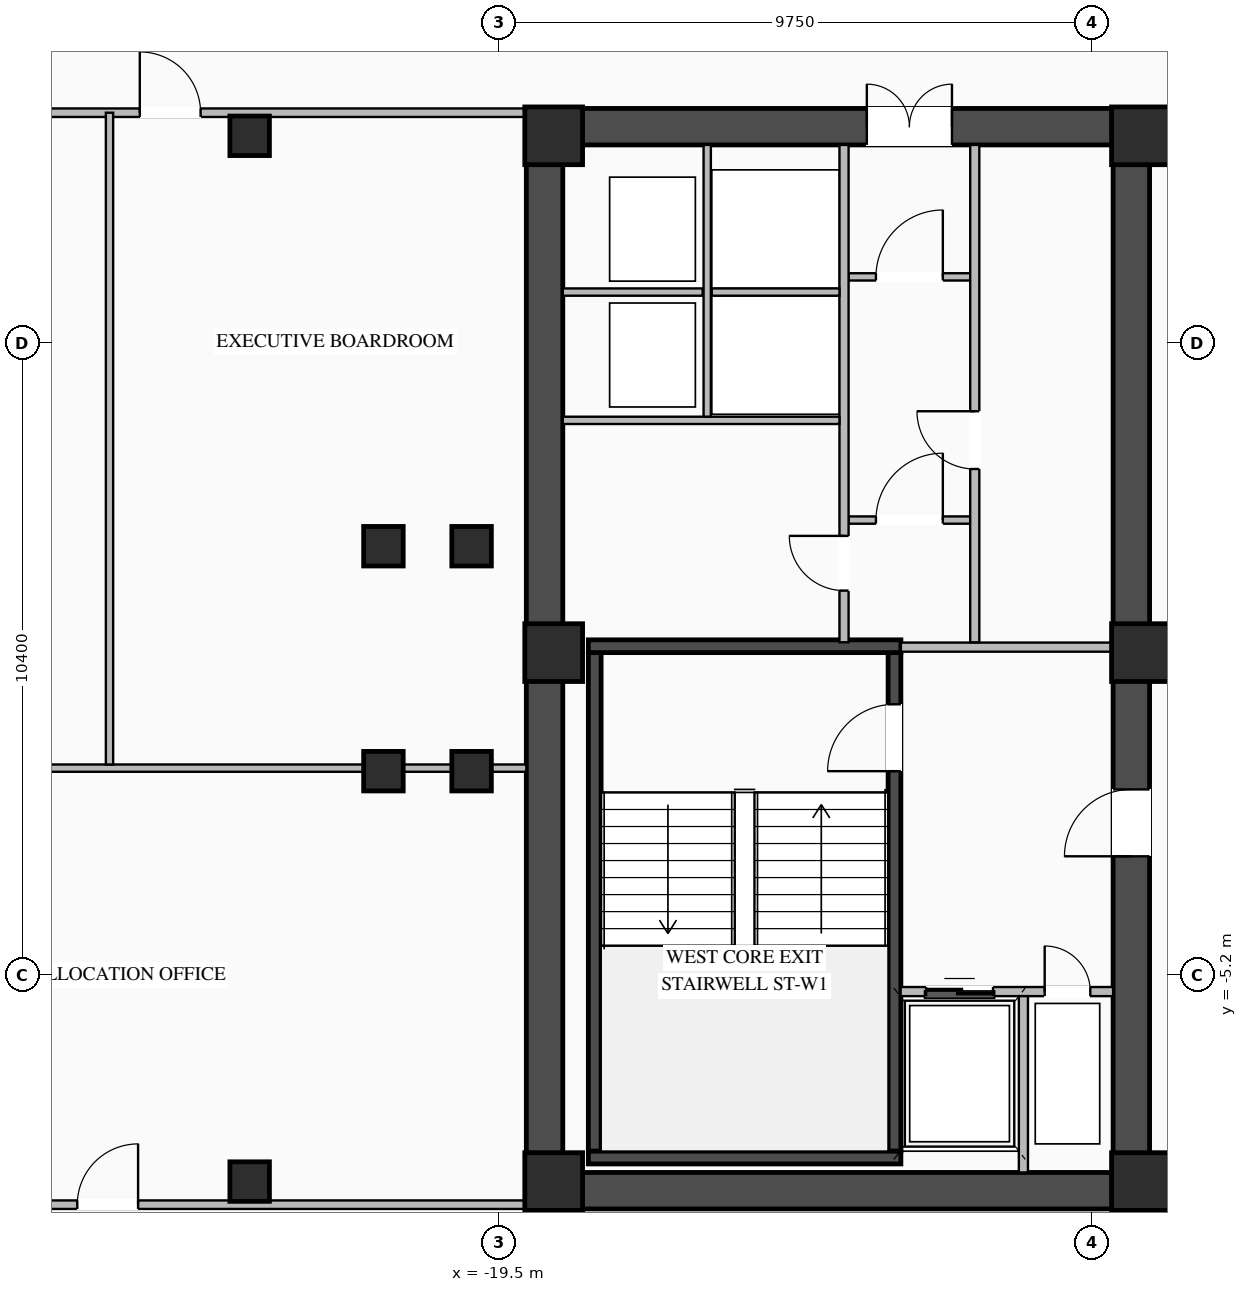
"""IFC4 building model, lengths in metres.
Left out: names, types, materials, properties, quantities, classifications, styles, units other than length and angle.
Written with IfcOpenShell. Run it as: python <this file> out.ifc"""

import sys

from ifc_helpers import new_model, si_unit, direction, frame, frame_2d, origin, origin_2d, place, context, subcontext, project, spatial, rectangle, i_section, extrude, element, fill, save


model = new_model("IFC4")
c1 = context("Model", 3, precision=1e-05, world=origin(), true_north=direction((0.0, 1.0)))
c2 = subcontext(c1, "Body", "Model", "MODEL_VIEW")
j1 = project(units=[si_unit("LENGTHUNIT", "METRE"), si_unit("PLANEANGLEUNIT", "RADIAN")], contexts=[c1])
p1 = place(None, origin())
s1 = spatial("IfcSite", under=j1, at=p1, CompositionType="ELEMENT")
p2 = place(p1, origin())
s2 = spatial("IfcBuilding", under=s1, at=p2, CompositionType="ELEMENT")
p3 = place(p2, frame((0.0, 0.0, 141.55)))
s3 = spatial("IfcBuildingStorey", under=s2, at=p3, CompositionType="ELEMENT", Elevation=141.55)
p4 = place(p3, frame((-19.05, -8.75, 0.0), z_axis=(0.0, 0.0, 1.0), x_axis=(1.0, 0.0, 0.0)))
e1 = element("IfcWall", 1, at=p4, inside=s3, PredefinedType="SHEAR", context=c2, shape_type="SweptSolid", body=[
    extrude(rectangle(XDim=10.25, YDim=0.6, at=frame_2d((5.125, 0.0))), origin(), (0.0, 0.0, 1.0), 3.27),
])
p5 = place(p3, frame((-19.05, 8.75, 0.0), z_axis=(0.0, 0.0, 1.0), x_axis=(1.0, 0.0, 0.0)))
e2 = element("IfcWall", 2, at=p5, inside=s3, PredefinedType="SHEAR", context=c2, shape_type="SweptSolid", body=[
    extrude(rectangle(XDim=10.25, YDim=0.6, at=frame_2d((5.125, 0.0))), origin(), (0.0, 0.0, 1.0), 3.27),
])
p6 = place(p5, frame((5.6, 0.0, 0.0)))
e3 = element("IfcOpeningElement", 3, at=p6, cuts=e2, PredefinedType="OPENING", context=c2, shape_type="SweptSolid", body=[
    extrude(rectangle(XDim=1.4, YDim=2.05, at=frame_2d((0.7, 1.025))), frame((0.0, 0.31, 0.0), z_axis=(0.0, -1.0, 0.0), x_axis=(1.0, 0.0, 0.0)), (0.0, 0.0, 1.0), 0.62),
])
p7 = place(p3, frame((-18.75, -8.45, 0.0), z_axis=(0.0, 0.0, 1.0), x_axis=(0.0, 1.0, 0.0)))
e4 = element("IfcWall", 4, at=p7, inside=s3, PredefinedType="SHEAR", context=c2, shape_type="SweptSolid", body=[
    extrude(rectangle(XDim=16.9, YDim=0.6, at=frame_2d((8.45, 0.0))), origin(), (0.0, 0.0, 1.0), 3.27),
])
p8 = place(p3, frame((-9.1, -8.45, 0.0), z_axis=(0.0, 0.0, 1.0), x_axis=(0.0, 1.0, 0.0)))
e5 = element("IfcWall", 5, at=p8, inside=s3, PredefinedType="SHEAR", context=c2, shape_type="SweptSolid", body=[
    extrude(rectangle(XDim=16.9, YDim=0.6, at=frame_2d((8.45, 0.0))), origin(), (0.0, 0.0, 1.0), 3.27),
])
p9 = place(p8, frame((5.2, 0.0, 0.0)))
e6 = element("IfcOpeningElement", 6, at=p9, cuts=e5, PredefinedType="OPENING", context=c2, shape_type="SweptSolid", body=[
    extrude(rectangle(XDim=1.1, YDim=2.08, at=frame_2d((0.55, 1.04))), frame((0.0, 0.31, 0.0), z_axis=(0.0, -1.0, 0.0), x_axis=(1.0, 0.0, 0.0)), (0.0, 0.0, 1.0), 0.62),
])
p10 = place(p3, frame((-12.995, -8.1, 0.0), z_axis=(0.0, 0.0, 1.0), x_axis=(0.0, 1.0, 0.0)))
e7 = element("IfcWall", 7, at=p10, inside=s3, PredefinedType="SHEAR", context=c2, shape_type="SweptSolid", body=[
    extrude(rectangle(XDim=8.2, YDim=0.21, at=frame_2d((4.1, 0.0))), origin(), (0.0, 0.0, 1.0), 3.27),
])
p11 = place(p10, frame((6.25, 0.0, 0.0)))
e8 = element("IfcOpeningElement", 8, at=p11, cuts=e7, PredefinedType="OPENING", context=c2, shape_type="SweptSolid", body=[
    extrude(rectangle(XDim=1.1, YDim=2.15, at=frame_2d((0.55, 1.075))), frame((0.0, 0.115, 0.0), z_axis=(0.0, -1.0, 0.0), x_axis=(1.0, 0.0, 0.0)), (0.0, 0.0, 1.0), 0.23),
])
p12 = place(p3, frame((-17.925, -8.1, 0.0), z_axis=(0.0, 0.0, 1.0), x_axis=(0.0, 1.0, 0.0)))
e9 = element("IfcWall", 9, at=p12, inside=s3, PredefinedType="SHEAR", context=c2, shape_type="SweptSolid", body=[
    extrude(rectangle(XDim=8.2, YDim=0.21, at=frame_2d((4.1, 0.0))), origin(), (0.0, 0.0, 1.0), 3.27),
])
for number, where, z_axis, x_axis in (
    (10, (-18.03, -8.205, 0.0), (0.0, 0.0, 1.0), (1.0, 0.0, 0.0)),
    (11, (-12.89, 0.205, 0.0), (0.0, 0.0, 1.0), (-1.0, 0.0, 0.0)),
):
    element("IfcWall", number, at=place(p3, frame(where, z_axis=z_axis, x_axis=x_axis)), inside=s3, PredefinedType="SHEAR", context=c2, shape_type="SweptSolid", body=[
        extrude(rectangle(XDim=5.14, YDim=0.21, at=frame_2d((2.57, 0.0))), origin(), (0.0, 0.0, 1.0), 3.27),
    ])
for number, where, z_axis, x_axis in (
    (12, (-8.95, -8.6, 0.0), (0.0, 0.0, 1.0), (1.0, 0.0, 0.0)),
    (13, (-8.95, 0.1, 0.0), (0.0, 0.0, 1.0), (1.0, 0.0, 0.0)),
    (14, (-8.95, 8.6, 0.0), (0.0, 0.0, 1.0), (1.0, 0.0, 0.0)),
    (15, (-18.6, -8.6, 0.0), (0.0, 0.0, 1.0), (1.0, 0.0, 0.0)),
    (16, (-18.6, 0.1, 0.0), (0.0, 0.0, 1.0), (1.0, 0.0, 0.0)),
    (17, (-18.6, 8.6, 0.0), (0.0, 0.0, 1.0), (1.0, 0.0, 0.0)),
):
    element("IfcColumn", number, at=place(p3, frame(where, z_axis=z_axis, x_axis=x_axis)), inside=s3, PredefinedType="COLUMN", context=c2, shape_type="SweptSolid", body=[
        extrude(rectangle(XDim=0.95, YDim=0.95, at=origin_2d()), origin(), (0.0, 0.0, 1.0), 3.45),
    ])
for number, where, z_axis, x_axis in (
    (18, (-21.4, -1.85, 0.0), (0.0, 0.0, 1.0), (1.0, 0.0, 0.0)),
    (19, (-21.4, 1.85, 0.0), (0.0, 0.0, 1.0), (1.0, 0.0, 0.0)),
    (20, (-19.95, -1.85, 0.0), (0.0, 0.0, 1.0), (1.0, 0.0, 0.0)),
    (21, (-19.95, 1.85, 0.0), (0.0, 0.0, 1.0), (1.0, 0.0, 0.0)),
    (22, (-23.6, -8.6, 0.0), (0.0, 0.0, 1.0), (1.0, 0.0, 0.0)),
    (23, (-23.6, 8.6, 0.0), (0.0, 0.0, 1.0), (1.0, 0.0, 0.0)),
):
    element("IfcColumn", number, at=place(p3, frame(where, z_axis=z_axis, x_axis=x_axis)), inside=s3, PredefinedType="COLUMN", context=c2, shape_type="SweptSolid", body=[
        extrude(i_section(OverallWidth=0.65, OverallDepth=0.65, WebThickness=0.028, FlangeThickness=0.04, at=origin_2d()), origin(), (0.0, 0.0, 1.0), 3.45),
    ])
p13 = place(p3, frame((-12.895, -5.475, 0.0), z_axis=(0.0, 0.0, 1.0), x_axis=(1.0, 0.0, 0.0)))
e24 = element("IfcWall", 24, at=p13, inside=s3, PredefinedType="STANDARD", context=c2, shape_type="SweptSolid", body=[
    extrude(rectangle(XDim=3.495, YDim=0.15, at=frame_2d((1.748, 0.0))), origin(), (0.0, 0.0, 1.0), 3.25),
])
p14 = place(p13, frame((0.42, 0.0, 0.0)))
e25 = element("IfcOpeningElement", 25, at=p14, cuts=e24, PredefinedType="OPENING", context=c2, shape_type="SweptSolid", body=[
    extrude(rectangle(XDim=1.1, YDim=2.15, at=frame_2d((0.55, 1.075))), frame((0.0, 0.085, 0.0), z_axis=(0.0, -1.0, 0.0), x_axis=(1.0, 0.0, 0.0)), (0.0, 0.0, 1.0), 0.17),
])
p15 = place(p13, frame((2.37, 0.0, 0.0)))
e26 = element("IfcOpeningElement", 26, at=p15, cuts=e24, PredefinedType="OPENING", context=c2, shape_type="SweptSolid", body=[
    extrude(rectangle(XDim=0.75, YDim=2.05, at=frame_2d((0.375, 1.025))), frame((0.0, 0.085, 0.0), z_axis=(0.0, -1.0, 0.0), x_axis=(1.0, 0.0, 0.0)), (0.0, 0.0, 1.0), 0.17),
])
p16 = place(p3, frame((-10.875, -8.45, 0.0), z_axis=(0.0, 0.0, 1.0), x_axis=(0.0, 1.0, 0.0)))
e27 = element("IfcWall", 27, at=p16, inside=s3, PredefinedType="STANDARD", context=c2, shape_type="SweptSolid", body=[
    extrude(rectangle(XDim=2.9, YDim=0.15, at=frame_2d((1.45, 0.0))), origin(), (0.0, 0.0, 1.0), 3.25),
])
p17 = place(p3, frame((-12.89, 0.19, 0.0), z_axis=(0.0, 0.0, 1.0), x_axis=(1.0, 0.0, 0.0)))
e28 = element("IfcWall", 28, at=p17, inside=s3, PredefinedType="STANDARD", context=c2, shape_type="SweptSolid", body=[
    extrude(rectangle(XDim=3.49, YDim=0.15, at=frame_2d((1.745, 0.0))), origin(), (0.0, 0.0, 1.0), 2.645),
])
p18 = place(p3, frame((-13.75, 2.28, 0.0), z_axis=(0.0, 0.0, 1.0), x_axis=(1.0, 0.0, 0.0)))
e29 = element("IfcWall", 29, at=p18, inside=s3, PredefinedType="STANDARD", context=c2, shape_type="SweptSolid", body=[
    extrude(rectangle(XDim=2.0, YDim=0.12, at=frame_2d((1.0, 0.0))), origin(), (0.0, 0.0, 1.0), 3.25),
])
p19 = place(p18, frame((0.45, 0.0, 0.0)))
e30 = element("IfcOpeningElement", 30, at=p19, cuts=e29, PredefinedType="OPENING", context=c2, shape_type="SweptSolid", body=[
    extrude(rectangle(XDim=1.1, YDim=2.1, at=frame_2d((0.55, 1.05))), frame((0.0, 0.07, 0.0), z_axis=(0.0, -1.0, 0.0), x_axis=(1.0, 0.0, 0.0)), (0.0, 0.0, 1.0), 0.14),
])
p20 = place(p3, frame((-13.75, 6.28, 0.0), z_axis=(0.0, 0.0, 1.0), x_axis=(1.0, 0.0, 0.0)))
e31 = element("IfcWall", 31, at=p20, inside=s3, PredefinedType="STANDARD", context=c2, shape_type="SweptSolid", body=[
    extrude(rectangle(XDim=2.0, YDim=0.12, at=frame_2d((1.0, 0.0))), origin(), (0.0, 0.0, 1.0), 3.25),
])
p21 = place(p20, frame((0.45, 0.0, 0.0)))
e32 = element("IfcOpeningElement", 32, at=p21, cuts=e31, PredefinedType="OPENING", context=c2, shape_type="SweptSolid", body=[
    extrude(rectangle(XDim=1.1, YDim=2.1, at=frame_2d((0.55, 1.05))), frame((0.0, 0.07, 0.0), z_axis=(0.0, -1.0, 0.0), x_axis=(1.0, 0.0, 0.0)), (0.0, 0.0, 1.0), 0.14),
])
p22 = place(p3, frame((-11.675, 0.27, 0.0), z_axis=(0.0, 0.0, 1.0), x_axis=(0.0, 1.0, 0.0)))
e33 = element("IfcWall", 33, at=p22, inside=s3, PredefinedType="STANDARD", context=c2, shape_type="SweptSolid", body=[
    extrude(rectangle(XDim=8.18, YDim=0.15, at=frame_2d((4.09, 0.0))), origin(), (0.0, 0.0, 1.0), 3.25),
])
p23 = place(p22, frame((2.85, 0.0, 0.0)))
e34 = element("IfcOpeningElement", 34, at=p23, cuts=e33, PredefinedType="OPENING", context=c2, shape_type="SweptSolid", body=[
    extrude(rectangle(XDim=0.95, YDim=2.05, at=frame_2d((0.475, 1.025))), frame((0.0, 0.085, 0.0), z_axis=(0.0, -1.0, 0.0), x_axis=(1.0, 0.0, 0.0)), (0.0, 0.0, 1.0), 0.17),
])
p24 = place(p3, frame((-13.825, 0.27, 0.0), z_axis=(0.0, 0.0, 1.0), x_axis=(0.0, 1.0, 0.0)))
e35 = element("IfcWall", 35, at=p24, inside=s3, PredefinedType="STANDARD", context=c2, shape_type="SweptSolid", body=[
    extrude(rectangle(XDim=8.18, YDim=0.15, at=frame_2d((4.09, 0.0))), origin(), (0.0, 0.0, 1.0), 3.25),
])
p25 = place(p24, frame((0.85, 0.0, 0.0)))
e36 = element("IfcOpeningElement", 36, at=p25, cuts=e35, PredefinedType="OPENING", context=c2, shape_type="SweptSolid", body=[
    extrude(rectangle(XDim=0.9, YDim=2.05, at=frame_2d((0.45, 1.025))), frame((0.0, 0.085, 0.0), z_axis=(0.0, -1.0, 0.0), x_axis=(1.0, 0.0, 0.0)), (0.0, 0.0, 1.0), 0.17),
])
p26 = place(p3, frame((-18.45, 3.92, 0.0), z_axis=(0.0, 0.0, 1.0), x_axis=(1.0, 0.0, 0.0)))
e37 = element("IfcWall", 37, at=p26, inside=s3, PredefinedType="STANDARD", context=c2, shape_type="SweptSolid", body=[
    extrude(rectangle(XDim=4.55, YDim=0.12, at=frame_2d((2.275, 0.0))), origin(), (0.0, 0.0, 1.0), 3.25),
])
p27 = place(p3, frame((-18.45, 6.03, 0.0), z_axis=(0.0, 0.0, 1.0), x_axis=(1.0, 0.0, 0.0)))
e38 = element("IfcWall", 38, at=p27, inside=s3, PredefinedType="STANDARD", context=c2, shape_type="SweptSolid", body=[
    extrude(rectangle(XDim=2.3, YDim=0.12, at=frame_2d((1.15, 0.0))), origin(), (0.0, 0.0, 1.0), 3.25),
])
p28 = place(p3, frame((-16.075, 3.98, 0.0), z_axis=(0.0, 0.0, 1.0), x_axis=(0.0, 1.0, 0.0)))
e39 = element("IfcWall", 39, at=p28, inside=s3, PredefinedType="STANDARD", context=c2, shape_type="SweptSolid", body=[
    extrude(rectangle(XDim=4.47, YDim=0.12, at=frame_2d((2.235, 0.0))), origin(), (0.0, 0.0, 1.0), 3.25),
])
p29 = place(p3, frame((-16.0, 6.03, 0.0), z_axis=(0.0, 0.0, 1.0), x_axis=(1.0, 0.0, 0.0)))
e40 = element("IfcWall", 40, at=p29, inside=s3, PredefinedType="STANDARD", context=c2, shape_type="SweptSolid", body=[
    extrude(rectangle(XDim=2.1, YDim=0.12, at=frame_2d((1.05, 0.0))), origin(), (0.0, 0.0, 1.0), 3.25),
])
p30 = place(p3, frame((-32.82, 8.98, 0.0), z_axis=(0.0, 0.0, 1.0), x_axis=(1.0, 0.0, 0.0)))
e41 = element("IfcWall", 41, at=p30, inside=s3, PredefinedType="STANDARD", context=c2, shape_type="SweptSolid", body=[
    extrude(rectangle(XDim=13.77, YDim=0.14, at=frame_2d((6.885, 0.0))), origin(), (0.0, 0.0, 1.0), 3.25),
])
p31 = place(p30, frame((1.171, 0.0, 0.0)))
e42 = element("IfcOpeningElement", 42, at=p31, cuts=e41, PredefinedType="OPENING", context=c2, shape_type="SweptSolid", body=[
    extrude(rectangle(XDim=1.0, YDim=2.08, at=frame_2d((0.5, 1.04))), frame((0.0, 0.08, 0.0), z_axis=(0.0, -1.0, 0.0), x_axis=(1.0, 0.0, 0.0)), (0.0, 0.0, 1.0), 0.16),
])
p32 = place(p30, frame((7.413, 0.0, 0.0)))
e43 = element("IfcOpeningElement", 43, at=p32, cuts=e41, PredefinedType="OPENING", context=c2, shape_type="SweptSolid", body=[
    extrude(rectangle(XDim=1.0, YDim=2.08, at=frame_2d((0.5, 1.04))), frame((0.0, 0.08, 0.0), z_axis=(0.0, -1.0, 0.0), x_axis=(1.0, 0.0, 0.0)), (0.0, 0.0, 1.0), 0.16),
])
p33 = place(p3, frame((-32.82, -8.98, 0.0), z_axis=(0.0, 0.0, 1.0), x_axis=(1.0, 0.0, 0.0)))
e44 = element("IfcWall", 44, at=p33, inside=s3, PredefinedType="STANDARD", context=c2, shape_type="SweptSolid", body=[
    extrude(rectangle(XDim=13.77, YDim=0.14, at=frame_2d((6.885, 0.0))), origin(), (0.0, 0.0, 1.0), 3.25),
])
p34 = place(p33, frame((6.385, 0.0, 0.0)))
e45 = element("IfcOpeningElement", 45, at=p34, cuts=e44, PredefinedType="OPENING", context=c2, shape_type="SweptSolid", body=[
    extrude(rectangle(XDim=1.0, YDim=2.08, at=frame_2d((0.5, 1.04))), frame((0.0, 0.08, 0.0), z_axis=(0.0, -1.0, 0.0), x_axis=(1.0, 0.0, 0.0)), (0.0, 0.0, 1.0), 0.16),
])
p35 = place(p3, frame((-32.82, -1.8, 0.0), z_axis=(0.0, 0.0, 1.0), x_axis=(1.0, 0.0, 0.0)))
e46 = element("IfcWall", 46, at=p35, inside=s3, PredefinedType="STANDARD", context=c2, shape_type="SweptSolid", body=[
    extrude(rectangle(XDim=13.77, YDim=0.12, at=frame_2d((6.885, 0.0))), origin(), (0.0, 0.0, 1.0), 3.25),
])
p36 = place(p3, frame((-25.905, -1.74, 0.0), z_axis=(0.0, 0.0, 1.0), x_axis=(0.0, 1.0, 0.0)))
e47 = element("IfcWall", 47, at=p36, inside=s3, PredefinedType="STANDARD", context=c2, shape_type="SweptSolid", body=[
    extrude(rectangle(XDim=10.72, YDim=0.12, at=frame_2d((5.36, 0.0))), origin(), (0.0, 0.0, 1.0), 3.25),
])
p37 = place(p11, origin())
e48 = element("IfcDoor", 48, at=p37, inside=s3, OperationType="SINGLE_SWING_LEFT", PredefinedType="DOOR", context=c2, shape_type="SweptSolid", body=[
    extrude(rectangle(XDim=1.1, YDim=2.15, at=frame_2d((0.55, 1.075))), frame((0.0, 0.025, 0.0), z_axis=(0.0, -1.0, 0.0), x_axis=(1.0, 0.0, 0.0)), (0.0, 0.0, 1.0), 0.05),
])
fill(e8, e48)
p38 = place(p14, origin())
e49 = element("IfcDoor", 49, at=p38, inside=s3, OperationType="DOUBLE_DOOR_SLIDING", PredefinedType="DOOR", context=c2, shape_type="SweptSolid", body=[
    extrude(rectangle(XDim=1.1, YDim=2.15, at=frame_2d((0.55, 1.075))), frame((0.0, 0.025, 0.0), z_axis=(0.0, -1.0, 0.0), x_axis=(1.0, 0.0, 0.0)), (0.0, 0.0, 1.0), 0.05),
])
fill(e25, e49)
p39 = place(p15, origin())
e50 = element("IfcDoor", 50, at=p39, inside=s3, OperationType="SINGLE_SWING_LEFT", PredefinedType="DOOR", context=c2, shape_type="SweptSolid", body=[
    extrude(rectangle(XDim=0.75, YDim=2.05, at=frame_2d((0.375, 1.025))), frame((0.0, 0.025, 0.0), z_axis=(0.0, -1.0, 0.0), x_axis=(1.0, 0.0, 0.0)), (0.0, 0.0, 1.0), 0.05),
])
fill(e26, e50)
p40 = place(p9, origin())
e51 = element("IfcDoor", 51, at=p40, inside=s3, OperationType="SINGLE_SWING_LEFT", PredefinedType="DOOR", context=c2, shape_type="SweptSolid", body=[
    extrude(rectangle(XDim=1.1, YDim=2.08, at=frame_2d((0.55, 1.04))), frame((0.0, 0.255, 0.0), z_axis=(0.0, -1.0, 0.0), x_axis=(1.0, 0.0, 0.0)), (0.0, 0.0, 1.0), 0.05),
])
fill(e6, e51)
p41 = place(p19, origin())
e52 = element("IfcDoor", 52, at=p41, inside=s3, OperationType="SINGLE_SWING_RIGHT", PredefinedType="DOOR", context=c2, shape_type="SweptSolid", body=[
    extrude(rectangle(XDim=1.1, YDim=2.1, at=frame_2d((0.55, 1.05))), frame((0.0, 0.025, 0.0), z_axis=(0.0, -1.0, 0.0), x_axis=(1.0, 0.0, 0.0)), (0.0, 0.0, 1.0), 0.05),
])
fill(e30, e52)
p42 = place(p21, origin())
e53 = element("IfcDoor", 53, at=p42, inside=s3, OperationType="SINGLE_SWING_RIGHT", PredefinedType="DOOR", context=c2, shape_type="SweptSolid", body=[
    extrude(rectangle(XDim=1.1, YDim=2.1, at=frame_2d((0.55, 1.05))), frame((0.0, 0.025, 0.0), z_axis=(0.0, -1.0, 0.0), x_axis=(1.0, 0.0, 0.0)), (0.0, 0.0, 1.0), 0.05),
])
fill(e32, e53)
p43 = place(p6, origin())
e54 = element("IfcDoor", 54, at=p43, inside=s3, OperationType="DOUBLE_DOOR_SINGLE_SWING", PredefinedType="DOOR", context=c2, shape_type="SweptSolid", body=[
    extrude(rectangle(XDim=1.4, YDim=2.05, at=frame_2d((0.7, 1.025))), frame((0.0, 0.245, 0.0), z_axis=(0.0, -1.0, 0.0), x_axis=(1.0, 0.0, 0.0)), (0.0, 0.0, 1.0), 0.05),
])
fill(e3, e54)
p44 = place(p23, origin())
e55 = element("IfcDoor", 55, at=p44, inside=s3, OperationType="SINGLE_SWING_RIGHT", PredefinedType="DOOR", context=c2, shape_type="SweptSolid", body=[
    extrude(rectangle(XDim=0.95, YDim=2.05, at=frame_2d((0.475, 1.025))), frame((0.0, 0.025, 0.0), z_axis=(0.0, -1.0, 0.0), x_axis=(1.0, 0.0, 0.0)), (0.0, 0.0, 1.0), 0.05),
])
fill(e34, e55)
p45 = place(p25, origin())
e56 = element("IfcDoor", 56, at=p45, inside=s3, OperationType="SINGLE_SWING_RIGHT", PredefinedType="DOOR", context=c2, shape_type="SweptSolid", body=[
    extrude(rectangle(XDim=0.9, YDim=2.05, at=frame_2d((0.45, 1.025))), frame((0.0, 0.025, 0.0), z_axis=(0.0, -1.0, 0.0), x_axis=(1.0, 0.0, 0.0)), (0.0, 0.0, 1.0), 0.05),
])
fill(e36, e56)
p46 = place(p32, origin())
e57 = element("IfcDoor", 57, at=p46, inside=s3, OperationType="SINGLE_SWING_LEFT", PredefinedType="DOOR", context=c2, shape_type="SweptSolid", body=[
    extrude(rectangle(XDim=1.0, YDim=2.08, at=frame_2d((0.5, 1.04))), frame((0.0, 0.025, 0.0), z_axis=(0.0, -1.0, 0.0), x_axis=(1.0, 0.0, 0.0)), (0.0, 0.0, 1.0), 0.05),
])
fill(e43, e57)
p47 = place(p34, origin())
e58 = element("IfcDoor", 58, at=p47, inside=s3, OperationType="SINGLE_SWING_RIGHT", PredefinedType="DOOR", context=c2, shape_type="SweptSolid", body=[
    extrude(rectangle(XDim=1.0, YDim=2.08, at=frame_2d((0.5, 1.04))), frame((0.0, 0.025, 0.0), z_axis=(0.0, -1.0, 0.0), x_axis=(1.0, 0.0, 0.0)), (0.0, 0.0, 1.0), 0.05),
])
fill(e45, e58)
save(model, sys.argv[1])
